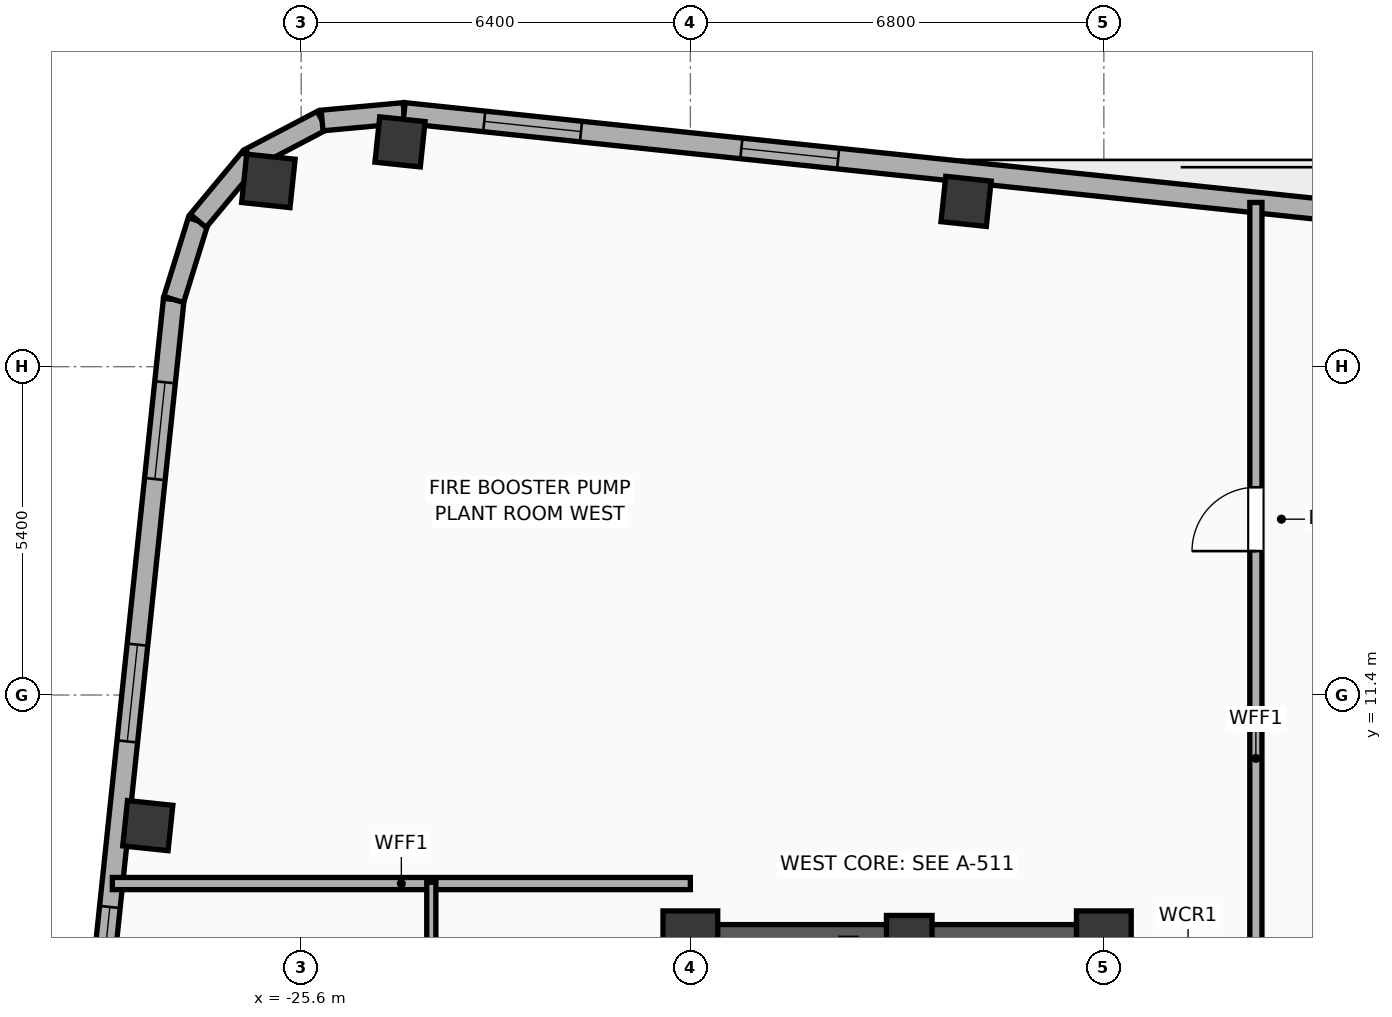
"""IFC4 building model, lengths in metres.
Left out: names, types, materials, properties, quantities, classifications, styles, units other than length and angle.
Written with IfcOpenShell. Run it as: python <this file> out.ifc"""

import sys

from ifc_helpers import new_model, si_unit, direction, frame, frame_2d, origin, origin_2d, place, context, subcontext, project, spatial, rectangle, hollow_rectangle, hollow_circle, extrude, element, fill, save


model = new_model("IFC4")
c1 = context("Model", 3, precision=1e-05, world=origin(), true_north=direction((0.0, 1.0)))
c2 = subcontext(c1, "Body", "Model", "MODEL_VIEW")
j1 = project(units=[si_unit("LENGTHUNIT", "METRE"), si_unit("PLANEANGLEUNIT", "RADIAN")], contexts=[c1])
p1 = place(None, origin())
s1 = spatial("IfcSite", under=j1, at=p1, CompositionType="ELEMENT")
p2 = place(p1, origin())
s2 = spatial("IfcBuilding", under=s1, at=p2, CompositionType="ELEMENT")
p3 = place(p2, frame((0.0, 0.0, 254.8)))
s3 = spatial("IfcBuildingStorey", under=s2, at=p3, CompositionType="ELEMENT", Elevation=254.8)
p4 = place(p3, frame((-19.2, 7.4, 0.0), z_axis=(0.0, 0.0, 1.0), x_axis=(1.0, 0.0, 0.0)))
e1 = element("IfcColumn", 1, at=p4, inside=s3, PredefinedType="COLUMN", context=c2, shape_type="SweptSolid", body=[
    extrude(rectangle(XDim=0.9, YDim=0.9, at=origin_2d()), origin(), (0.0, 0.0, 1.0), 5.2),
])
p5 = place(p3, frame((-15.6, 7.4, 0.0), z_axis=(0.0, 0.0, 1.0), x_axis=(1.0, 0.0, 0.0)))
e2 = element("IfcColumn", 2, at=p5, inside=s3, PredefinedType="COLUMN", context=c2, shape_type="SweptSolid", body=[
    extrude(rectangle(XDim=0.75, YDim=0.75, at=origin_2d()), origin(), (0.0, 0.0, 1.0), 5.2),
])
p6 = place(p3, frame((-12.4, 7.4, 0.0), z_axis=(0.0, 0.0, 1.0), x_axis=(1.0, 0.0, 0.0)))
e3 = element("IfcColumn", 3, at=p6, inside=s3, PredefinedType="COLUMN", context=c2, shape_type="SweptSolid", body=[
    extrude(rectangle(XDim=0.9, YDim=0.9, at=origin_2d()), origin(), (0.0, 0.0, 1.0), 5.2),
])
p7 = place(p3, frame((-19.425, 7.4, 0.0), z_axis=(0.0, 0.0, 1.0), x_axis=(1.0, 0.0, 0.0)))
e4 = element("IfcWall", 4, at=p7, inside=s3, PredefinedType="SHEAR", context=c2, shape_type="SweptSolid", body=[
    extrude(rectangle(XDim=7.25, YDim=0.45, at=frame_2d((3.625, 0.0))), origin(), (0.0, 0.0, 1.0), 4.8),
])
for number, where, z_axis, x_axis in (
    (5, (-14.666, 19.518, -0.4), (0.0, 0.0, 1.0), (0.995, -0.105, 0.0)),
    (6, (-23.975, 20.497, -0.4), (0.0, 0.0, 1.0), (0.995, -0.105, 0.0)),
):
    element("IfcColumn", number, at=place(p3, frame(where, z_axis=z_axis, x_axis=x_axis)), inside=s3, PredefinedType="COLUMN", context=c2, shape_type="SweptSolid", body=[
        extrude(hollow_rectangle(XDim=0.75, YDim=0.75, WallThickness=0.025, at=origin_2d()), origin(), (0.0, 0.0, 1.0), 5.6),
    ])
p8 = place(p3, frame((-26.139, 19.855, -0.4), z_axis=(0.0, 0.0, 1.0), x_axis=(0.994521895368, -0.104528463268, 0.0)))
e7 = element("IfcColumn", 7, at=p8, inside=s3, PredefinedType="COLUMN", context=c2, shape_type="SweptSolid", body=[
    extrude(hollow_circle(Radius=0.4, WallThickness=0.028, at=origin_2d()), origin(), (0.0, 0.0, 1.0), 5.6),
])
p9 = place(p3, frame((-28.123, 9.252, -0.4), z_axis=(0.0, 0.0, 1.0), x_axis=(0.994521895368, -0.104528463268, 0.0)))
e8 = element("IfcColumn", 8, at=p9, inside=s3, PredefinedType="COLUMN", context=c2, shape_type="SweptSolid", body=[
    extrude(hollow_rectangle(XDim=0.75, YDim=0.75, WallThickness=0.025, at=origin_2d()), origin(), (0.0, 0.0, 1.0), 5.6),
])
p10 = place(p3, frame((-30.87, -12.296, 0.0), z_axis=(0.0, 0.0, 1.0), x_axis=(0.104533282919, 0.994521388791, 0.0)))
e9 = element("IfcWall", 9, at=p10, inside=s3, PredefinedType="ELEMENTEDWALL", context=c2, shape_type="SweptSolid", body=[
    extrude(rectangle(XDim=30.366, YDim=0.34, at=frame_2d((15.183, 0.0))), origin(), (0.0, 0.0, 1.0), 3.69),
])
p11 = place(p10, frame((1.369, 0.0, 0.75)))
e10 = element("IfcOpeningElement", 10, at=p11, cuts=e9, PredefinedType="OPENING", context=c2, shape_type="SweptSolid", body=[
    extrude(rectangle(XDim=1.6, YDim=1.4, at=frame_2d((0.8, 0.7))), frame((0.0, 0.18, 0.0), z_axis=(0.0, -1.0, 0.0), x_axis=(1.0, 0.0, 0.0)), (0.0, 0.0, 1.0), 0.36),
])
p12 = place(p10, frame((5.707, 0.0, 0.75)))
e11 = element("IfcOpeningElement", 11, at=p12, cuts=e9, PredefinedType="OPENING", context=c2, shape_type="SweptSolid", body=[
    extrude(rectangle(XDim=1.6, YDim=1.4, at=frame_2d((0.8, 0.7))), frame((0.0, 0.18, 0.0), z_axis=(0.0, -1.0, 0.0), x_axis=(1.0, 0.0, 0.0)), (0.0, 0.0, 1.0), 0.36),
])
p13 = place(p10, frame((10.045, 0.0, 0.75)))
e12 = element("IfcOpeningElement", 12, at=p13, cuts=e9, PredefinedType="OPENING", context=c2, shape_type="SweptSolid", body=[
    extrude(rectangle(XDim=1.6, YDim=1.4, at=frame_2d((0.8, 0.7))), frame((0.0, 0.18, 0.0), z_axis=(0.0, -1.0, 0.0), x_axis=(1.0, 0.0, 0.0)), (0.0, 0.0, 1.0), 0.36),
])
p14 = place(p10, frame((14.383, 0.0, 0.75)))
e13 = element("IfcOpeningElement", 13, at=p14, cuts=e9, PredefinedType="OPENING", context=c2, shape_type="SweptSolid", body=[
    extrude(rectangle(XDim=1.6, YDim=1.4, at=frame_2d((0.8, 0.7))), frame((0.0, 0.18, 0.0), z_axis=(0.0, -1.0, 0.0), x_axis=(1.0, 0.0, 0.0)), (0.0, 0.0, 1.0), 0.36),
])
p15 = place(p10, frame((18.721, 0.0, 0.75)))
e14 = element("IfcOpeningElement", 14, at=p15, cuts=e9, PredefinedType="OPENING", context=c2, shape_type="SweptSolid", body=[
    extrude(rectangle(XDim=1.6, YDim=1.4, at=frame_2d((0.8, 0.7))), frame((0.0, 0.18, 0.0), z_axis=(0.0, -1.0, 0.0), x_axis=(1.0, 0.0, 0.0)), (0.0, 0.0, 1.0), 0.36),
])
p16 = place(p10, frame((23.059, 0.0, 0.75)))
e15 = element("IfcOpeningElement", 15, at=p16, cuts=e9, PredefinedType="OPENING", context=c2, shape_type="SweptSolid", body=[
    extrude(rectangle(XDim=1.6, YDim=1.4, at=frame_2d((0.8, 0.7))), frame((0.0, 0.18, 0.0), z_axis=(0.0, -1.0, 0.0), x_axis=(1.0, 0.0, 0.0)), (0.0, 0.0, 1.0), 0.36),
])
p17 = place(p10, frame((27.397, 0.0, 0.75)))
e16 = element("IfcOpeningElement", 16, at=p17, cuts=e9, PredefinedType="OPENING", context=c2, shape_type="SweptSolid", body=[
    extrude(rectangle(XDim=1.6, YDim=1.4, at=frame_2d((0.8, 0.7))), frame((0.0, 0.18, 0.0), z_axis=(0.0, -1.0, 0.0), x_axis=(1.0, 0.0, 0.0)), (0.0, 0.0, 1.0), 0.36),
])
p18 = place(p3, frame((-27.696, 17.905, 0.0), z_axis=(0.0, 0.0, 1.0), x_axis=(0.296416228123, 0.955058856671, 0.0)))
e17 = element("IfcWall", 17, at=p18, inside=s3, PredefinedType="ELEMENTEDWALL", context=c2, shape_type="SweptSolid", body=[
    extrude(rectangle(XDim=1.354, YDim=0.34, at=frame_2d((0.677, 0.0))), origin(), (0.0, 0.0, 1.0), 4.8),
])
p19 = place(p3, frame((-27.294, 19.198, 0.0), z_axis=(0.0, 0.0, 1.0), x_axis=(0.639501603217, 0.768789762863, 0.0)))
e18 = element("IfcWall", 18, at=p19, inside=s3, PredefinedType="ELEMENTEDWALL", context=c2, shape_type="SweptSolid", body=[
    extrude(rectangle(XDim=1.337, YDim=0.34, at=frame_2d((0.668, 0.0))), origin(), (0.0, 0.0, 1.0), 4.8),
])
p20 = place(p3, frame((-26.439, 20.226, 0.0), z_axis=(0.0, 0.0, 1.0), x_axis=(0.884922182678, 0.465738908193, 0.0)))
e19 = element("IfcWall", 19, at=p20, inside=s3, PredefinedType="ELEMENTEDWALL", context=c2, shape_type="SweptSolid", body=[
    extrude(rectangle(XDim=1.337, YDim=0.34, at=frame_2d((0.668, 0.0))), origin(), (0.0, 0.0, 1.0), 3.69),
])
p21 = place(p3, frame((-25.256, 20.848, 0.0), z_axis=(0.0, 0.0, 1.0), x_axis=(0.995813013343, 0.091413579172, 0.0)))
e20 = element("IfcWall", 20, at=p21, inside=s3, PredefinedType="ELEMENTEDWALL", context=c2, shape_type="SweptSolid", body=[
    extrude(rectangle(XDim=1.354, YDim=0.34, at=frame_2d((0.677, 0.0))), origin(), (0.0, 0.0, 1.0), 3.69),
])
p22 = place(p3, frame((-23.908, 20.972, 0.0), z_axis=(0.0, 0.0, 1.0), x_axis=(0.994521888554, -0.104528528102, 0.0)))
e21 = element("IfcWall", 21, at=p22, inside=s3, PredefinedType="ELEMENTEDWALL", context=c2, shape_type="SweptSolid", body=[
    extrude(rectangle(XDim=46.766, YDim=0.34, at=frame_2d((23.383, 0.0))), origin(), (0.0, 0.0, 1.0), 3.69),
])
p23 = place(p22, frame((1.326, 0.0, 0.75)))
e22 = element("IfcOpeningElement", 22, at=p23, cuts=e21, PredefinedType="OPENING", context=c2, shape_type="SweptSolid", body=[
    extrude(rectangle(XDim=1.6, YDim=1.4, at=frame_2d((0.8, 0.7))), frame((0.0, 0.18, 0.0), z_axis=(0.0, -1.0, 0.0), x_axis=(1.0, 0.0, 0.0)), (0.0, 0.0, 1.0), 0.36),
])
p24 = place(p22, frame((5.577, 0.0, 0.75)))
e23 = element("IfcOpeningElement", 23, at=p24, cuts=e21, PredefinedType="OPENING", context=c2, shape_type="SweptSolid", body=[
    extrude(rectangle(XDim=1.6, YDim=1.4, at=frame_2d((0.8, 0.7))), frame((0.0, 0.18, 0.0), z_axis=(0.0, -1.0, 0.0), x_axis=(1.0, 0.0, 0.0)), (0.0, 0.0, 1.0), 0.36),
])
p25 = place(p22, frame((22.583, 0.0, 0.0)))
e24 = element("IfcOpeningElement", 24, at=p25, cuts=e21, PredefinedType="OPENING", context=c2, shape_type="SweptSolid", body=[
    extrude(rectangle(XDim=1.5, YDim=2.05, at=frame_2d((0.75, 1.025))), frame((0.0, 0.18, 0.0), z_axis=(0.0, -1.0, 0.0), x_axis=(1.0, 0.0, 0.0)), (0.0, 0.0, 1.0), 0.36),
])
p26 = place(p22, frame((31.086, 0.0, 0.75)))
e25 = element("IfcOpeningElement", 25, at=p26, cuts=e21, PredefinedType="OPENING", context=c2, shape_type="SweptSolid", body=[
    extrude(rectangle(XDim=1.6, YDim=1.4, at=frame_2d((0.8, 0.7))), frame((0.0, 0.18, 0.0), z_axis=(0.0, -1.0, 0.0), x_axis=(1.0, 0.0, 0.0)), (0.0, 0.0, 1.0), 0.36),
])
p27 = place(p22, frame((39.589, 0.0, 0.75)))
e26 = element("IfcOpeningElement", 26, at=p27, cuts=e21, PredefinedType="OPENING", context=c2, shape_type="SweptSolid", body=[
    extrude(rectangle(XDim=1.6, YDim=1.4, at=frame_2d((0.8, 0.7))), frame((0.0, 0.18, 0.0), z_axis=(0.0, -1.0, 0.0), x_axis=(1.0, 0.0, 0.0)), (0.0, 0.0, 1.0), 0.36),
])
p28 = place(p22, frame((43.841, 0.0, 0.75)))
e27 = element("IfcOpeningElement", 27, at=p28, cuts=e21, PredefinedType="OPENING", context=c2, shape_type="SweptSolid", body=[
    extrude(rectangle(XDim=1.6, YDim=1.4, at=frame_2d((0.8, 0.7))), frame((0.0, 0.18, 0.0), z_axis=(0.0, -1.0, 0.0), x_axis=(1.0, 0.0, 0.0)), (0.0, 0.0, 1.0), 0.36),
])
p29 = place(p3, frame((-28.705, 8.3, 0.0), z_axis=(0.0, 0.0, 1.0), x_axis=(1.0, 0.0, 0.0)))
e28 = element("IfcWall", 28, at=p29, inside=s3, PredefinedType="PARTITIONING", context=c2, shape_type="SweptSolid", body=[
    extrude(rectangle(XDim=9.505, YDim=0.2, at=frame_2d((4.753, 0.0))), origin(), (0.0, 0.0, 1.0), 3.69),
])
p30 = place(p3, frame((-23.46, 4.82, 0.0), z_axis=(0.0, 0.0, 1.0), x_axis=(0.0, 1.0, 0.0)))
e29 = element("IfcWall", 29, at=p30, inside=s3, PredefinedType="PLUMBINGWALL", context=c2, shape_type="SweptSolid", body=[
    extrude(rectangle(XDim=3.5, YDim=0.15, at=frame_2d((1.75, 0.0))), origin(), (0.0, 0.0, 1.0), 4.8),
])
p31 = place(p30, frame((1.25, 0.0, 0.0)))
e30 = element("IfcOpeningElement", 30, at=p31, cuts=e29, PredefinedType="OPENING", context=c2, shape_type="SweptSolid", body=[
    extrude(rectangle(XDim=1.0, YDim=2.05, at=frame_2d((0.5, 1.025))), frame((0.0, 0.085, 0.0), z_axis=(0.0, -1.0, 0.0), x_axis=(1.0, 0.0, 0.0)), (0.0, 0.0, 1.0), 0.17),
])
p32 = place(p3, frame((-9.9, 7.1, 0.0), z_axis=(0.0, 0.0, 1.0), x_axis=(0.0, 1.0, 0.0)))
e31 = element("IfcWall", 31, at=p32, inside=s3, PredefinedType="PARTITIONING", context=c2, shape_type="SweptSolid", body=[
    extrude(rectangle(XDim=12.4, YDim=0.2, at=frame_2d((6.2, 0.0))), origin(), (0.0, 0.0, 1.0), 4.8),
])
p33 = place(p32, frame((6.667, 0.0, 0.0)))
e32 = element("IfcOpeningElement", 32, at=p33, cuts=e31, PredefinedType="OPENING", context=c2, shape_type="SweptSolid", body=[
    extrude(rectangle(XDim=1.05, YDim=2.05, at=frame_2d((0.525, 1.025))), frame((0.0, 0.11, 0.0), z_axis=(0.0, -1.0, 0.0), x_axis=(1.0, 0.0, 0.0)), (0.0, 0.0, 1.0), 0.22),
])
p34 = place(p15, origin())
e33 = element("IfcWindow", 33, at=p34, inside=s3, PartitioningType="SINGLE_PANEL", PredefinedType="WINDOW", context=c2, shape_type="SweptSolid", body=[
    extrude(rectangle(XDim=1.6, YDim=1.4, at=frame_2d((0.8, 0.7))), frame((0.0, 0.03, 0.0), z_axis=(0.0, -1.0, 0.0), x_axis=(1.0, 0.0, 0.0)), (0.0, 0.0, 1.0), 0.06),
])
fill(e14, e33)
p35 = place(p16, origin())
e34 = element("IfcWindow", 34, at=p35, inside=s3, PartitioningType="SINGLE_PANEL", PredefinedType="WINDOW", context=c2, shape_type="SweptSolid", body=[
    extrude(rectangle(XDim=1.6, YDim=1.4, at=frame_2d((0.8, 0.7))), frame((0.0, 0.03, 0.0), z_axis=(0.0, -1.0, 0.0), x_axis=(1.0, 0.0, 0.0)), (0.0, 0.0, 1.0), 0.06),
])
fill(e15, e34)
p36 = place(p17, origin())
e35 = element("IfcWindow", 35, at=p36, inside=s3, PartitioningType="SINGLE_PANEL", PredefinedType="WINDOW", context=c2, shape_type="SweptSolid", body=[
    extrude(rectangle(XDim=1.6, YDim=1.4, at=frame_2d((0.8, 0.7))), frame((0.0, 0.03, 0.0), z_axis=(0.0, -1.0, 0.0), x_axis=(1.0, 0.0, 0.0)), (0.0, 0.0, 1.0), 0.06),
])
fill(e16, e35)
p37 = place(p23, origin())
e36 = element("IfcWindow", 36, at=p37, inside=s3, PartitioningType="SINGLE_PANEL", PredefinedType="WINDOW", context=c2, shape_type="SweptSolid", body=[
    extrude(rectangle(XDim=1.6, YDim=1.4, at=frame_2d((0.8, 0.7))), frame((0.0, 0.03, 0.0), z_axis=(0.0, -1.0, 0.0), x_axis=(1.0, 0.0, 0.0)), (0.0, 0.0, 1.0), 0.06),
])
fill(e22, e36)
p38 = place(p24, origin())
e37 = element("IfcWindow", 37, at=p38, inside=s3, PartitioningType="SINGLE_PANEL", PredefinedType="WINDOW", context=c2, shape_type="SweptSolid", body=[
    extrude(rectangle(XDim=1.6, YDim=1.4, at=frame_2d((0.8, 0.7))), frame((0.0, 0.03, 0.0), z_axis=(0.0, -1.0, 0.0), x_axis=(1.0, 0.0, 0.0)), (0.0, 0.0, 1.0), 0.06),
])
fill(e23, e37)
p39 = place(p33, origin())
e38 = element("IfcDoor", 38, at=p39, inside=s3, OperationType="SINGLE_SWING_LEFT", PredefinedType="DOOR", context=c2, shape_type="SweptSolid", body=[
    extrude(rectangle(XDim=1.05, YDim=2.05, at=frame_2d((0.525, 1.025))), frame((0.0, 0.025, 0.0), z_axis=(0.0, -1.0, 0.0), x_axis=(1.0, 0.0, 0.0)), (0.0, 0.0, 1.0), 0.05),
])
fill(e32, e38)
save(model, sys.argv[1])
